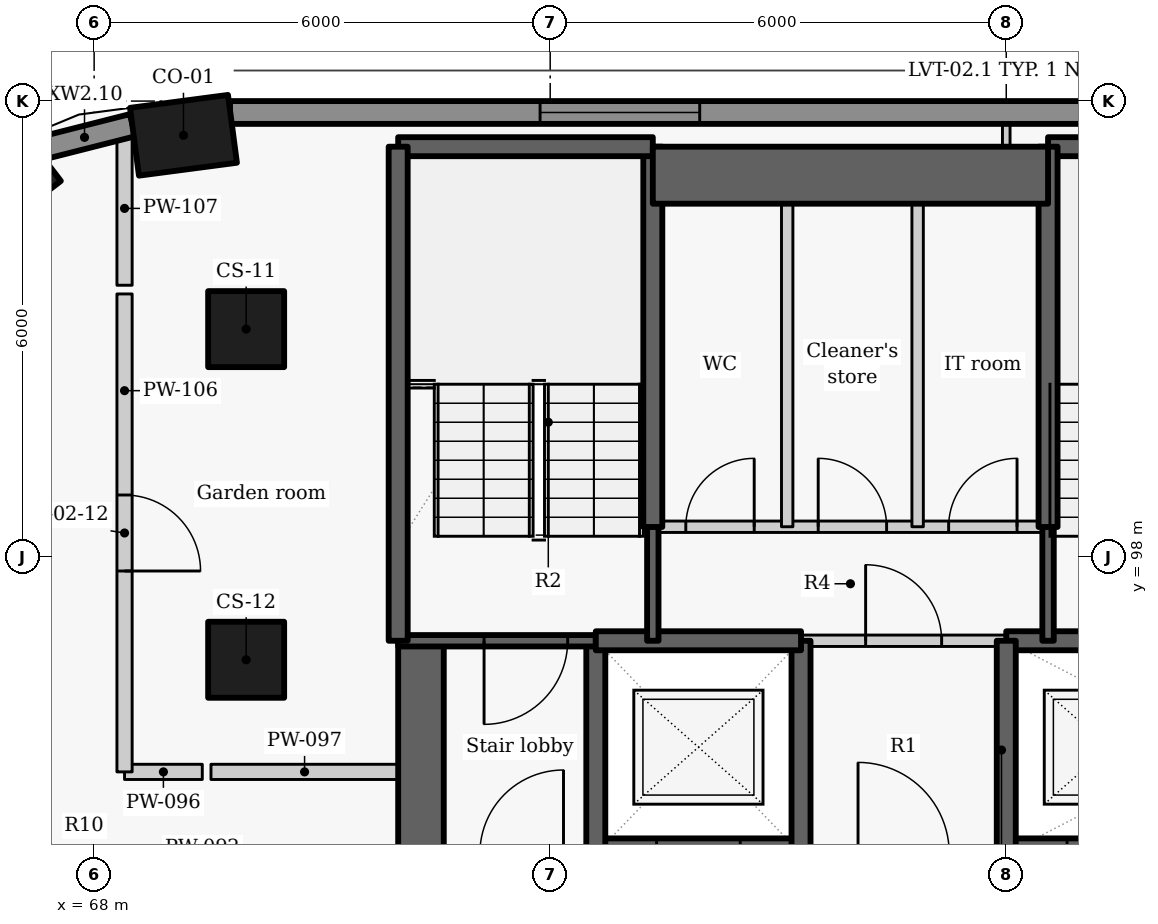
"""IFC4 building model, lengths in metres.
Left out: names, types, materials, properties, quantities, classifications, styles, units other than length and angle.
Written with IfcOpenShell. Run it as: python <this file> out.ifc"""

import sys

from ifc_helpers import new_model, si_unit, direction, frame, frame_2d, origin, origin_2d, place, context, subcontext, project, spatial, rectangle, extrude, element, fill, save


model = new_model("IFC4")
c1 = context("Model", 3, precision=1e-05, world=origin(), true_north=direction((0.0, 1.0)))
c2 = subcontext(c1, "Body", "Model", "MODEL_VIEW")
j1 = project(units=[si_unit("LENGTHUNIT", "METRE"), si_unit("PLANEANGLEUNIT", "RADIAN")], contexts=[c1])
p1 = place(None, origin())
s1 = spatial("IfcSite", under=j1, at=p1, CompositionType="ELEMENT")
p2 = place(p1, origin())
s2 = spatial("IfcBuilding", under=s1, at=p2, CompositionType="ELEMENT")
p3 = place(p2, frame((0.0, 0.0, 140.4)))
s3 = spatial("IfcBuildingStorey", under=s2, at=p3, CompositionType="ELEMENT", Elevation=140.4)
for number, where, z_axis, x_axis in (
    (1, (69.175, 103.55, 0.0), (0.0, 0.0, 1.0), (-0.991, -0.131, 0.0)),
    (2, (66.773, 102.91, 0.0), (0.0, 0.0, 1.0), (-0.793, -0.609, 0.0)),
):
    element("IfcColumn", number, at=place(p3, frame(where, z_axis=z_axis, x_axis=x_axis)), inside=s3, PredefinedType="COLUMN", context=c2, shape_type="SweptSolid", body=[
        extrude(rectangle(XDim=1.3, YDim=0.9, at=origin_2d()), origin(), (0.0, 0.0, 1.0), 3.3),
    ])
for number, where, z_axis, x_axis in (
    (3, (70.0, 101.0, 0.0), (0.0, 0.0, 1.0), (0.0, -1.0, 0.0)),
    (4, (70.0, 96.65, 0.0), (0.0, 0.0, 1.0), (0.0, -1.0, 0.0)),
):
    element("IfcColumn", number, at=place(p3, frame(where, z_axis=z_axis, x_axis=x_axis)), inside=s3, PredefinedType="COLUMN", context=c2, shape_type="SweptSolid", body=[
        extrude(rectangle(XDim=1.0, YDim=1.0, at=origin_2d()), origin(), (0.0, 0.0, 1.0), 3.3),
    ])
p4 = place(p3, frame((90.179, 103.85, 0.0), z_axis=(0.0, 0.0, 1.0), x_axis=(-1.0, 0.0, 0.0)))
e5 = element("IfcWall", 5, at=p4, inside=s3, PredefinedType="SOLIDWALL", context=c2, shape_type="SweptSolid", body=[
    extrude(rectangle(XDim=20.391, YDim=0.3, at=frame_2d((10.196, 0.0))), origin(), (0.0, 0.0, 1.0), 2.425),
])
p5 = place(p4, frame((4.051, 0.0, 0.9)))
e6 = element("IfcOpeningElement", 6, at=p5, cuts=e5, PredefinedType="OPENING", context=c2, shape_type="SweptSolid", body=[
    extrude(rectangle(XDim=2.1, YDim=1.1, at=frame_2d((1.05, 0.55))), frame((0.0, 0.16, 0.0), z_axis=(0.0, -1.0, 0.0), x_axis=(1.0, 0.0, 0.0)), (0.0, 0.0, 1.0), 0.32),
])
p6 = place(p4, frame((14.212, 0.0, 0.9)))
e7 = element("IfcOpeningElement", 7, at=p6, cuts=e5, PredefinedType="OPENING", context=c2, shape_type="SweptSolid", body=[
    extrude(rectangle(XDim=2.1, YDim=1.1, at=frame_2d((1.05, 0.55))), frame((0.0, 0.16, 0.0), z_axis=(0.0, -1.0, 0.0), x_axis=(1.0, 0.0, 0.0)), (0.0, 0.0, 1.0), 0.32),
])
p7 = place(p3, frame((68.506, 103.683, 0.0), z_axis=(0.0, 0.0, 1.0), x_axis=(-0.96924493129, -0.246098076322, 0.0)))
e8 = element("IfcWall", 8, at=p7, inside=s3, PredefinedType="SOLIDWALL", context=c2, shape_type="SweptSolid", body=[
    extrude(rectangle(XDim=1.305, YDim=0.3, at=frame_2d((0.653, 0.0))), origin(), (0.0, 0.0, 1.0), 2.425),
])
p8 = place(p3, frame((72.3, 87.8, -0.275), z_axis=(0.0, 0.0, 1.0), x_axis=(0.0, 1.0, 0.0)))
e9 = element("IfcWall", 9, at=p8, inside=s3, PredefinedType="SHEAR", context=c2, shape_type="SweptSolid", body=[
    extrude(rectangle(XDim=9.1, YDim=0.6, at=frame_2d((4.55, 0.0))), origin(), (0.0, 0.0, 1.0), 3.3),
])
p9 = place(p8, frame((3.852, 0.0, 0.275)))
e10 = element("IfcOpeningElement", 10, at=p9, cuts=e9, PredefinedType="OPENING", context=c2, shape_type="SweptSolid", body=[
    extrude(rectangle(XDim=1.5, YDim=2.1, at=frame_2d((0.75, 1.05))), frame((0.0, 0.31, 0.0), z_axis=(0.0, -1.0, 0.0), x_axis=(1.0, 0.0, 0.0)), (0.0, 0.0, 1.0), 0.62),
])
p10 = place(p3, frame((74.597, 94.1, -0.275), z_axis=(0.0, 0.0, 1.0), x_axis=(1.0, 0.0, 0.0)))
e11 = element("IfcWall", 11, at=p10, inside=s3, PredefinedType="SHEAR", context=c2, shape_type="SweptSolid", body=[
    extrude(rectangle(XDim=2.706, YDim=0.4, at=frame_2d((1.353, 0.0))), origin(), (0.0, 0.0, 1.0), 3.3),
])
p11 = place(p10, frame((0.803, 0.0, 0.275)))
e12 = element("IfcOpeningElement", 12, at=p11, cuts=e11, PredefinedType="OPENING", context=c2, shape_type="SweptSolid", body=[
    extrude(rectangle(XDim=1.1, YDim=2.1, at=frame_2d((0.55, 1.05))), frame((0.0, 0.21, 0.0), z_axis=(0.0, -1.0, 0.0), x_axis=(1.0, 0.0, 0.0)), (0.0, 0.0, 1.0), 0.42),
])
p12 = place(p3, frame((79.997, 94.1, -0.275), z_axis=(0.0, 0.0, 1.0), x_axis=(1.0, 0.0, 0.0)))
e13 = element("IfcWall", 13, at=p12, inside=s3, PredefinedType="SHEAR", context=c2, shape_type="SweptSolid", body=[
    extrude(rectangle(XDim=5.406, YDim=0.4, at=frame_2d((2.703, 0.0))), origin(), (0.0, 0.0, 1.0), 3.3),
])
p13 = place(p12, frame((0.803, 0.0, 0.275)))
e14 = element("IfcOpeningElement", 14, at=p13, cuts=e13, PredefinedType="OPENING", context=c2, shape_type="SweptSolid", body=[
    extrude(rectangle(XDim=1.1, YDim=2.1, at=frame_2d((0.55, 1.05))), frame((0.0, 0.21, 0.0), z_axis=(0.0, -1.0, 0.0), x_axis=(1.0, 0.0, 0.0)), (0.0, 0.0, 1.0), 0.42),
])
p14 = place(p3, frame((74.6, 94.1, -0.275), z_axis=(0.0, 0.0, 1.0), x_axis=(0.0, 1.0, 0.0)))
e15 = element("IfcWall", 15, at=p14, inside=s3, PredefinedType="SHEAR", context=c2, shape_type="SweptSolid", body=[
    extrude(rectangle(XDim=2.8, YDim=0.25, at=frame_2d((1.4, 0.0))), origin(), (0.0, 0.0, 1.0), 3.3),
])
p15 = place(p3, frame((74.6, 96.9, -0.275), z_axis=(0.0, 0.0, 1.0), x_axis=(-1.0, 0.0, 0.0)))
e16 = element("IfcWall", 16, at=p15, inside=s3, PredefinedType="SHEAR", context=c2, shape_type="SweptSolid", body=[
    extrude(rectangle(XDim=2.6, YDim=0.15, at=frame_2d((1.3, 0.0))), origin(), (0.0, 0.0, 1.0), 3.3),
])
p16 = place(p15, frame((0.37, 0.0, 0.275)))
e17 = element("IfcOpeningElement", 17, at=p16, cuts=e16, PredefinedType="OPENING", context=c2, shape_type="SweptSolid", body=[
    extrude(rectangle(XDim=1.1, YDim=2.1, at=frame_2d((0.55, 1.05))), frame((0.0, 0.085, 0.0), z_axis=(0.0, -1.0, 0.0), x_axis=(1.0, 0.0, 0.0)), (0.0, 0.0, 1.0), 0.17),
])
p17 = place(p3, frame((77.3, 94.1, -0.275), z_axis=(0.0, 0.0, 1.0), x_axis=(0.0, 1.0, 0.0)))
e18 = element("IfcWall", 18, at=p17, inside=s3, PredefinedType="SHEAR", context=c2, shape_type="SweptSolid", body=[
    extrude(rectangle(XDim=2.8, YDim=0.25, at=frame_2d((1.4, 0.0))), origin(), (0.0, 0.0, 1.0), 3.3),
])
p18 = place(p3, frame((74.6, 96.9, -0.275), z_axis=(0.0, 0.0, 1.0), x_axis=(1.0, 0.0, 0.0)))
e19 = element("IfcWall", 19, at=p18, inside=s3, PredefinedType="SHEAR", context=c2, shape_type="SweptSolid", body=[
    extrude(rectangle(XDim=2.7, YDim=0.25, at=frame_2d((1.35, 0.0))), origin(), (0.0, 0.0, 1.0), 3.3),
])
p19 = place(p3, frame((80.0, 96.9, -0.275), z_axis=(0.0, 0.0, 1.0), x_axis=(1.0, 0.0, 0.0)))
e20 = element("IfcWall", 20, at=p19, inside=s3, PredefinedType="SHEAR", context=c2, shape_type="SweptSolid", body=[
    extrude(rectangle(XDim=8.0, YDim=0.25, at=frame_2d((4.0, 0.0))), origin(), (0.0, 0.0, 1.0), 3.3),
])
p20 = place(p19, frame((3.849, 0.0, 0.275)))
e21 = element("IfcOpeningElement", 21, at=p20, cuts=e20, PredefinedType="OPENING", context=c2, shape_type="SweptSolid", body=[
    extrude(rectangle(XDim=1.1, YDim=2.1, at=frame_2d((0.55, 1.05))), frame((0.0, 0.135, 0.0), z_axis=(0.0, -1.0, 0.0), x_axis=(1.0, 0.0, 0.0)), (0.0, 0.0, 1.0), 0.27),
])
p21 = place(p3, frame((80.0, 94.1, -0.275), z_axis=(0.0, 0.0, 1.0), x_axis=(0.0, 1.0, 0.0)))
e22 = element("IfcWall", 22, at=p21, inside=s3, PredefinedType="SHEAR", context=c2, shape_type="SweptSolid", body=[
    extrude(rectangle(XDim=2.8, YDim=0.25, at=frame_2d((1.4, 0.0))), origin(), (0.0, 0.0, 1.0), 3.3),
])
p22 = place(p3, frame((77.3, 96.9, 0.0), z_axis=(0.0, 0.0, 1.0), x_axis=(1.0, 0.0, 0.0)))
e23 = element("IfcWall", 23, at=p22, inside=s3, PredefinedType="PARTITIONING", context=c2, shape_type="SweptSolid", body=[
    extrude(rectangle(XDim=2.7, YDim=0.15, at=frame_2d((1.35, 0.0))), origin(), (0.0, 0.0, 1.0), 3.025),
])
p23 = place(p22, frame((0.85, 0.0, 0.0)))
e24 = element("IfcOpeningElement", 24, at=p23, cuts=e23, PredefinedType="OPENING", context=c2, shape_type="SweptSolid", body=[
    extrude(rectangle(XDim=1.0, YDim=2.1, at=frame_2d((0.5, 1.05))), frame((0.0, 0.085, 0.0), z_axis=(0.0, -1.0, 0.0), x_axis=(1.0, 0.0, 0.0)), (0.0, 0.0, 1.0), 0.17),
])
p24 = place(p3, frame((75.35, 96.9, -0.275), z_axis=(0.0, 0.0, 1.0), x_axis=(0.0, 1.0, 0.0)))
e25 = element("IfcWall", 25, at=p24, inside=s3, PredefinedType="SHEAR", context=c2, shape_type="SweptSolid", body=[
    extrude(rectangle(XDim=1.503, YDim=0.15, at=frame_2d((0.751, 0.0))), origin(), (0.0, 0.0, 1.0), 3.3),
])
p25 = place(p3, frame((75.35, 98.397, -0.275), z_axis=(0.0, 0.0, 1.0), x_axis=(0.0, 1.0, 0.0)))
e26 = element("IfcWall", 26, at=p25, inside=s3, PredefinedType="SHEAR", context=c2, shape_type="SweptSolid", body=[
    extrude(rectangle(XDim=5.003, YDim=0.25, at=frame_2d((2.501, 0.0))), origin(), (0.0, 0.0, 1.0), 3.3),
])
p26 = place(p3, frame((72.0, 103.4, -0.275), z_axis=(0.0, 0.0, 1.0), x_axis=(1.0, 0.0, 0.0)))
e27 = element("IfcWall", 27, at=p26, inside=s3, PredefinedType="SHEAR", context=c2, shape_type="SweptSolid", body=[
    extrude(rectangle(XDim=3.35, YDim=0.25, at=frame_2d((1.675, 0.0))), origin(), (0.0, 0.0, 1.0), 3.3),
])
p27 = place(p3, frame((80.55, 103.4, -0.275), z_axis=(0.0, 0.0, 1.0), x_axis=(1.0, 0.0, 0.0)))
e28 = element("IfcWall", 28, at=p27, inside=s3, PredefinedType="SHEAR", context=c2, shape_type="SweptSolid", body=[
    extrude(rectangle(XDim=2.85, YDim=0.25, at=frame_2d((1.425, 0.0))), origin(), (0.0, 0.0, 1.0), 3.3),
])
p28 = place(p3, frame((72.0, 96.9, -0.275), z_axis=(0.0, 0.0, 1.0), x_axis=(0.0, 1.0, 0.0)))
e29 = element("IfcWall", 29, at=p28, inside=s3, PredefinedType="SHEAR", context=c2, shape_type="SweptSolid", body=[
    extrude(rectangle(XDim=6.5, YDim=0.25, at=frame_2d((3.25, 0.0))), origin(), (0.0, 0.0, 1.0), 3.3),
])
p29 = place(p3, frame((80.55, 96.9, -0.275), z_axis=(0.0, 0.0, 1.0), x_axis=(0.0, 1.0, 0.0)))
e30 = element("IfcWall", 30, at=p29, inside=s3, PredefinedType="SHEAR", context=c2, shape_type="SweptSolid", body=[
    extrude(rectangle(XDim=1.503, YDim=0.15, at=frame_2d((0.751, 0.0))), origin(), (0.0, 0.0, 1.0), 3.3),
])
p30 = place(p3, frame((80.55, 98.397, -0.275), z_axis=(0.0, 0.0, 1.0), x_axis=(0.0, 1.0, 0.0)))
e31 = element("IfcWall", 31, at=p30, inside=s3, PredefinedType="SHEAR", context=c2, shape_type="SweptSolid", body=[
    extrude(rectangle(XDim=5.003, YDim=0.25, at=frame_2d((2.501, 0.0))), origin(), (0.0, 0.0, 1.0), 3.3),
])
p31 = place(p3, frame((75.35, 103.025, -0.275), z_axis=(0.0, 0.0, 1.0), x_axis=(1.0, 0.0, 0.0)))
e32 = element("IfcWall", 32, at=p31, inside=s3, PredefinedType="SHEAR", context=c2, shape_type="SweptSolid", body=[
    extrude(rectangle(XDim=5.2, YDim=0.75, at=frame_2d((2.6, 0.0))), origin(), (0.0, 0.0, 1.0), 3.3),
])
p32 = place(p3, frame((75.35, 98.4, 0.0), z_axis=(0.0, 0.0, 1.0), x_axis=(1.0, 0.0, 0.0)))
e33 = element("IfcWall", 33, at=p32, inside=s3, PredefinedType="PARTITIONING", context=c2, shape_type="SweptSolid", body=[
    extrude(rectangle(XDim=5.2, YDim=0.15, at=frame_2d((2.6, 0.0))), origin(), (0.0, 0.0, 1.0), 3.025),
])
p33 = place(p32, frame((0.434, 0.0, 0.0)))
e34 = element("IfcOpeningElement", 34, at=p33, cuts=e33, PredefinedType="OPENING", context=c2, shape_type="SweptSolid", body=[
    extrude(rectangle(XDim=0.9, YDim=2.1, at=frame_2d((0.45, 1.05))), frame((0.0, 0.085, 0.0), z_axis=(0.0, -1.0, 0.0), x_axis=(1.0, 0.0, 0.0)), (0.0, 0.0, 1.0), 0.17),
])
p34 = place(p32, frame((2.176, 0.0, 0.0)))
e35 = element("IfcOpeningElement", 35, at=p34, cuts=e33, PredefinedType="OPENING", context=c2, shape_type="SweptSolid", body=[
    extrude(rectangle(XDim=0.9, YDim=2.1, at=frame_2d((0.45, 1.05))), frame((0.0, 0.085, 0.0), z_axis=(0.0, -1.0, 0.0), x_axis=(1.0, 0.0, 0.0)), (0.0, 0.0, 1.0), 0.17),
])
p35 = place(p32, frame((3.892, 0.0, 0.0)))
e36 = element("IfcOpeningElement", 36, at=p35, cuts=e33, PredefinedType="OPENING", context=c2, shape_type="SweptSolid", body=[
    extrude(rectangle(XDim=0.9, YDim=2.1, at=frame_2d((0.45, 1.05))), frame((0.0, 0.085, 0.0), z_axis=(0.0, -1.0, 0.0), x_axis=(1.0, 0.0, 0.0)), (0.0, 0.0, 1.0), 0.17),
])
for number, where, z_axis, x_axis in (
    (37, (77.118, 98.4, 0.0), (0.0, 0.0, 1.0), (0.0, 1.0, 0.0)),
    (38, (78.834, 98.4, 0.0), (0.0, 0.0, 1.0), (0.0, 1.0, 0.0)),
):
    element("IfcWall", number, at=place(p3, frame(where, z_axis=z_axis, x_axis=x_axis)), inside=s3, PredefinedType="PARTITIONING", context=c2, shape_type="SweptSolid", body=[
        extrude(rectangle(XDim=5.0, YDim=0.15, at=frame_2d((2.5, 0.0))), origin(), (0.0, 0.0, 1.0), 3.025),
    ])
p36 = place(p3, frame((68.4, 95.175, 0.0), z_axis=(0.0, 0.0, 1.0), x_axis=(1.0, 0.0, 0.0)))
e39 = element("IfcWall", 39, at=p36, inside=s3, PredefinedType="PARTITIONING", context=c2, shape_type="SweptSolid", body=[
    extrude(rectangle(XDim=1.023, YDim=0.2, at=frame_2d((0.511, 0.0))), origin(), (0.0, 0.0, 1.0), 3.025),
])
p37 = place(p3, frame((69.537, 95.175, 0.0), z_axis=(0.0, 0.0, 1.0), x_axis=(1.0, 0.0, 0.0)))
e40 = element("IfcWall", 40, at=p37, inside=s3, PredefinedType="PARTITIONING", context=c2, shape_type="SweptSolid", body=[
    extrude(rectangle(XDim=2.463, YDim=0.2, at=frame_2d((1.231, 0.0))), origin(), (0.0, 0.0, 1.0), 2.505),
])
p38 = place(p3, frame((68.4, 101.463, 0.0), z_axis=(0.0, 0.0, 1.0), x_axis=(0.0, -1.0, 0.0)))
e41 = element("IfcWall", 41, at=p38, inside=s3, PredefinedType="PARTITIONING", context=c2, shape_type="SweptSolid", body=[
    extrude(rectangle(XDim=6.288, YDim=0.2, at=frame_2d((3.144, 0.0))), origin(), (0.0, 0.0, 1.0), 3.025),
])
p39 = place(p38, frame((2.645, 0.0, 0.0)))
e42 = element("IfcOpeningElement", 42, at=p39, cuts=e41, PredefinedType="OPENING", context=c2, shape_type="SweptSolid", body=[
    extrude(rectangle(XDim=1.0, YDim=2.1, at=frame_2d((0.5, 1.05))), frame((0.0, 0.11, 0.0), z_axis=(0.0, -1.0, 0.0), x_axis=(1.0, 0.0, 0.0)), (0.0, 0.0, 1.0), 0.22),
])
p40 = place(p3, frame((68.4, 101.577, 0.0), z_axis=(0.0, 0.0, 1.0), x_axis=(0.0, 1.0, 0.0)))
e43 = element("IfcWall", 43, at=p40, inside=s3, PredefinedType="PARTITIONING", context=c2, shape_type="SweptSolid", body=[
    extrude(rectangle(XDim=2.022, YDim=0.2, at=frame_2d((1.011, 0.0))), origin(), (0.0, 0.0, 1.0), 2.405),
])
p41 = place(p3, frame((80.0, 103.4, 0.0), z_axis=(0.0, 0.0, 1.0), x_axis=(0.0, 1.0, 0.0)))
e44 = element("IfcWall", 44, at=p41, inside=s3, PredefinedType="PARTITIONING", context=c2, shape_type="SweptSolid", body=[
    extrude(rectangle(XDim=0.3, YDim=0.1, at=frame_2d((0.15, 0.0))), origin(), (0.0, 0.0, 1.0), 3.025),
])
p42 = place(p6, origin())
e45 = element("IfcWindow", 45, at=p42, inside=s3, PartitioningType="SINGLE_PANEL", PredefinedType="WINDOW", context=c2, shape_type="SweptSolid", body=[
    extrude(rectangle(XDim=2.1, YDim=1.1, at=frame_2d((1.05, 0.55))), frame((0.0, 0.03, 0.0), z_axis=(0.0, -1.0, 0.0), x_axis=(1.0, 0.0, 0.0)), (0.0, 0.0, 1.0), 0.06),
])
fill(e7, e45)
p43 = place(p23, origin())
e46 = element("IfcDoor", 46, at=p43, inside=s3, OperationType="SINGLE_SWING_LEFT", PredefinedType="DOOR", context=c2, shape_type="SweptSolid", body=[
    extrude(rectangle(XDim=1.0, YDim=2.1, at=frame_2d((0.5, 1.05))), frame((0.0, 0.025, 0.0), z_axis=(0.0, -1.0, 0.0), x_axis=(1.0, 0.0, 0.0)), (0.0, 0.0, 1.0), 0.05),
])
fill(e24, e46)
p44 = place(p33, origin())
e47 = element("IfcDoor", 47, at=p44, inside=s3, OperationType="SINGLE_SWING_RIGHT", PredefinedType="DOOR", context=c2, shape_type="SweptSolid", body=[
    extrude(rectangle(XDim=0.9, YDim=2.1, at=frame_2d((0.45, 1.05))), frame((0.0, 0.025, 0.0), z_axis=(0.0, -1.0, 0.0), x_axis=(1.0, 0.0, 0.0)), (0.0, 0.0, 1.0), 0.05),
])
fill(e34, e47)
p45 = place(p34, origin())
e48 = element("IfcDoor", 48, at=p45, inside=s3, OperationType="SINGLE_SWING_LEFT", PredefinedType="DOOR", context=c2, shape_type="SweptSolid", body=[
    extrude(rectangle(XDim=0.9, YDim=2.1, at=frame_2d((0.45, 1.05))), frame((0.0, 0.025, 0.0), z_axis=(0.0, -1.0, 0.0), x_axis=(1.0, 0.0, 0.0)), (0.0, 0.0, 1.0), 0.05),
])
fill(e35, e48)
p46 = place(p35, origin())
e49 = element("IfcDoor", 49, at=p46, inside=s3, OperationType="SINGLE_SWING_RIGHT", PredefinedType="DOOR", context=c2, shape_type="SweptSolid", body=[
    extrude(rectangle(XDim=0.9, YDim=2.1, at=frame_2d((0.45, 1.05))), frame((0.0, 0.025, 0.0), z_axis=(0.0, -1.0, 0.0), x_axis=(1.0, 0.0, 0.0)), (0.0, 0.0, 1.0), 0.05),
])
fill(e36, e49)
p47 = place(p16, origin())
e50 = element("IfcDoor", 50, at=p47, inside=s3, OperationType="SINGLE_SWING_RIGHT", PredefinedType="DOOR", context=c2, shape_type="SweptSolid", body=[
    extrude(rectangle(XDim=1.1, YDim=2.1, at=frame_2d((0.55, 1.05))), frame((0.0, 0.025, 0.0), z_axis=(0.0, -1.0, 0.0), x_axis=(1.0, 0.0, 0.0)), (0.0, 0.0, 1.0), 0.05),
])
fill(e17, e50)
p48 = place(p39, origin())
e51 = element("IfcDoor", 51, at=p48, inside=s3, OperationType="SINGLE_SWING_RIGHT", PredefinedType="DOOR", context=c2, shape_type="SweptSolid", body=[
    extrude(rectangle(XDim=1.0, YDim=2.1, at=frame_2d((0.5, 1.05))), frame((0.0, 0.025, 0.0), z_axis=(0.0, -1.0, 0.0), x_axis=(1.0, 0.0, 0.0)), (0.0, 0.0, 1.0), 0.05),
])
fill(e42, e51)
save(model, sys.argv[1])
